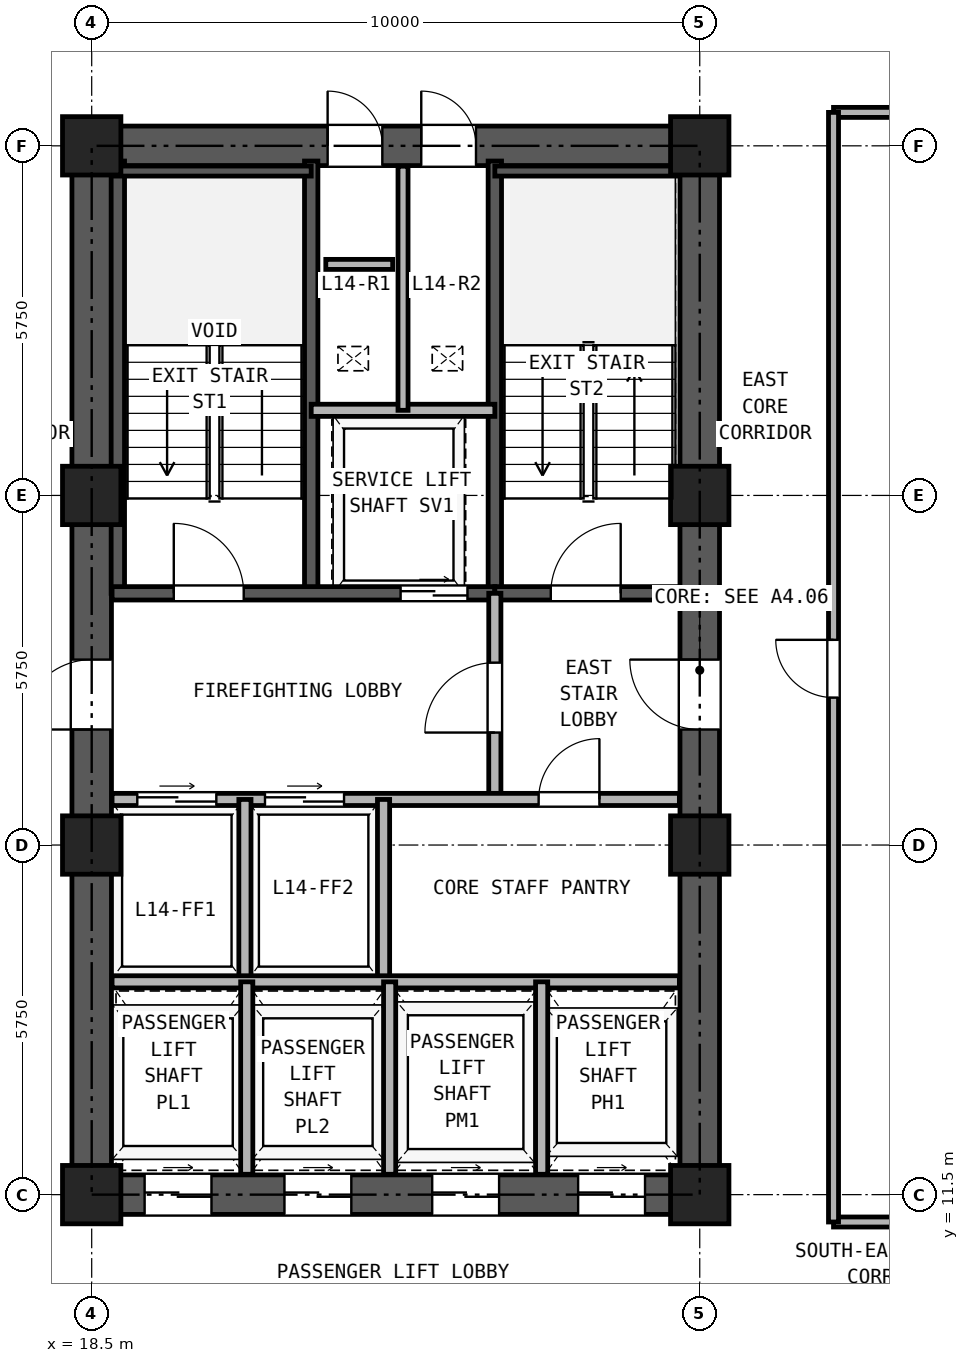
"""IFC4 building model, lengths in metres.
Left out: names, types, materials, properties, quantities, classifications, styles, units other than length and angle.
Written with IfcOpenShell. Run it as: python <this file> out.ifc"""

import sys

from ifc_helpers import new_model, si_unit, direction, frame, frame_2d, origin, origin_2d, place, context, subcontext, project, spatial, rectangle, hollow_rectangle, extrude, source, transform, mapped, element, fill, save


model = new_model("IFC4")
c1 = context("Model", 3, precision=1e-05, world=origin(), true_north=direction((0.0, 1.0)))
c2 = subcontext(c1, "Body", "Model", "MODEL_VIEW")
j1 = project(units=[si_unit("LENGTHUNIT", "METRE"), si_unit("PLANEANGLEUNIT", "RADIAN")], contexts=[c1])
p1 = place(None, origin())
s1 = spatial("IfcSite", under=j1, at=p1, CompositionType="ELEMENT")
p2 = place(p1, origin())
s2 = spatial("IfcBuilding", under=s1, at=p2, CompositionType="ELEMENT")
p3 = place(p2, frame((0.0, 0.0, 54.9)))
s3 = spatial("IfcBuildingStorey", under=s2, at=p3, CompositionType="ELEMENT", Elevation=54.9)
m1 = source(origin(), c2, "Body", "SweptSolid", [
    extrude(hollow_rectangle(XDim=0.96, YDim=0.96, WallThickness=0.06, at=origin_2d()), origin(), (0.0, 0.0, 1.0), 3.32),
])
for number, where, z_axis, x_axis in (
    (1, (18.5, 11.5, 0.0), (0.0, 0.0, 1.0), (1.0, 0.0, 0.0)),
    (2, (18.5, 17.25, 0.0), (0.0, 0.0, 1.0), (1.0, 0.0, 0.0)),
    (3, (18.5, 23.0, 0.0), (0.0, 0.0, 1.0), (1.0, 0.0, 0.0)),
    (4, (18.5, 28.75, 0.0), (0.0, 0.0, 1.0), (1.0, 0.0, 0.0)),
    (5, (28.5, 11.5, 0.0), (0.0, 0.0, 1.0), (1.0, 0.0, 0.0)),
    (6, (28.5, 17.25, 0.0), (0.0, 0.0, 1.0), (1.0, 0.0, 0.0)),
    (7, (28.5, 23.0, 0.0), (0.0, 0.0, 1.0), (1.0, 0.0, 0.0)),
    (8, (28.5, 28.75, 0.0), (0.0, 0.0, 1.0), (1.0, 0.0, 0.0)),
):
    element("IfcColumn", number, at=place(p3, frame(where, z_axis=z_axis, x_axis=x_axis)), inside=s3, PredefinedType="COLUMN", context=c2, shape_type="MappedRepresentation", body=[
        mapped(m1, transform((0.0, 0.0, 0.0), x_axis=(1.0, 0.0, 0.0), y_axis=(0.0, 1.0, 0.0), z_axis=(0.0, 0.0, 1.0), scale=1.0)),
    ])
p4 = place(p3, frame((18.175, 11.5, 0.0), z_axis=(0.0, 0.0, 1.0), x_axis=(1.0, 0.0, 0.0)))
e9 = element("IfcWall", 9, at=p4, inside=s3, PredefinedType="SHEAR", context=c2, shape_type="SweptSolid", body=[
    extrude(rectangle(XDim=10.65, YDim=0.65, at=frame_2d((5.325, 0.0))), origin(), (0.0, 0.0, 1.0), 3.32),
])
p5 = place(p4, frame((1.195, 0.0, 0.0)))
e10 = element("IfcOpeningElement", 10, at=p5, cuts=e9, PredefinedType="OPENING", context=c2, shape_type="SweptSolid", body=[
    extrude(rectangle(XDim=1.1, YDim=2.25, at=frame_2d((0.55, 1.125))), frame((0.0, 0.335, 0.0), z_axis=(0.0, -1.0, 0.0), x_axis=(1.0, 0.0, 0.0)), (0.0, 0.0, 1.0), 0.67),
])
p6 = place(p4, frame((3.495, 0.0, 0.0)))
e11 = element("IfcOpeningElement", 11, at=p6, cuts=e9, PredefinedType="OPENING", context=c2, shape_type="SweptSolid", body=[
    extrude(rectangle(XDim=1.1, YDim=2.25, at=frame_2d((0.55, 1.125))), frame((0.0, 0.335, 0.0), z_axis=(0.0, -1.0, 0.0), x_axis=(1.0, 0.0, 0.0)), (0.0, 0.0, 1.0), 0.67),
])
p7 = place(p4, frame((5.925, 0.0, 0.0)))
e12 = element("IfcOpeningElement", 12, at=p7, cuts=e9, PredefinedType="OPENING", context=c2, shape_type="SweptSolid", body=[
    extrude(rectangle(XDim=1.1, YDim=2.25, at=frame_2d((0.55, 1.125))), frame((0.0, 0.335, 0.0), z_axis=(0.0, -1.0, 0.0), x_axis=(1.0, 0.0, 0.0)), (0.0, 0.0, 1.0), 0.67),
])
p8 = place(p4, frame((8.325, 0.0, 0.0)))
e13 = element("IfcOpeningElement", 13, at=p8, cuts=e9, PredefinedType="OPENING", context=c2, shape_type="SweptSolid", body=[
    extrude(rectangle(XDim=1.1, YDim=2.25, at=frame_2d((0.55, 1.125))), frame((0.0, 0.335, 0.0), z_axis=(0.0, -1.0, 0.0), x_axis=(1.0, 0.0, 0.0)), (0.0, 0.0, 1.0), 0.67),
])
p9 = place(p3, frame((18.175, 28.75, 0.0), z_axis=(0.0, 0.0, 1.0), x_axis=(1.0, 0.0, 0.0)))
e14 = element("IfcWall", 14, at=p9, inside=s3, PredefinedType="SHEAR", context=c2, shape_type="SweptSolid", body=[
    extrude(rectangle(XDim=10.65, YDim=0.65, at=frame_2d((5.325, 0.0))), origin(), (0.0, 0.0, 1.0), 3.32),
])
p10 = place(p9, frame((4.205, 0.0, 0.0)))
e15 = element("IfcOpeningElement", 15, at=p10, cuts=e14, PredefinedType="OPENING", context=c2, shape_type="SweptSolid", body=[
    extrude(rectangle(XDim=0.9, YDim=2.05, at=frame_2d((0.45, 1.025))), frame((0.0, 0.335, 0.0), z_axis=(0.0, -1.0, 0.0), x_axis=(1.0, 0.0, 0.0)), (0.0, 0.0, 1.0), 0.67),
])
p11 = place(p9, frame((5.745, 0.0, 0.0)))
e16 = element("IfcOpeningElement", 16, at=p11, cuts=e14, PredefinedType="OPENING", context=c2, shape_type="SweptSolid", body=[
    extrude(rectangle(XDim=0.9, YDim=2.05, at=frame_2d((0.45, 1.025))), frame((0.0, 0.335, 0.0), z_axis=(0.0, -1.0, 0.0), x_axis=(1.0, 0.0, 0.0)), (0.0, 0.0, 1.0), 0.67),
])
p12 = place(p3, frame((18.5, 11.825, 0.0), z_axis=(0.0, 0.0, 1.0), x_axis=(0.0, 1.0, 0.0)))
e17 = element("IfcWall", 17, at=p12, inside=s3, PredefinedType="SHEAR", context=c2, shape_type="SweptSolid", body=[
    extrude(rectangle(XDim=16.6, YDim=0.65, at=frame_2d((8.3, 0.0))), origin(), (0.0, 0.0, 1.0), 3.32),
])
p13 = place(p12, frame((7.325, 0.0, 0.0)))
e18 = element("IfcOpeningElement", 18, at=p13, cuts=e17, PredefinedType="OPENING", context=c2, shape_type="SweptSolid", body=[
    extrude(rectangle(XDim=1.15, YDim=2.2, at=frame_2d((0.575, 1.1))), frame((0.0, 0.335, 0.0), z_axis=(0.0, -1.0, 0.0), x_axis=(1.0, 0.0, 0.0)), (0.0, 0.0, 1.0), 0.67),
])
p14 = place(p3, frame((28.5, 11.825, 0.0), z_axis=(0.0, 0.0, 1.0), x_axis=(0.0, 1.0, 0.0)))
e19 = element("IfcWall", 19, at=p14, inside=s3, PredefinedType="SHEAR", context=c2, shape_type="SweptSolid", body=[
    extrude(rectangle(XDim=16.6, YDim=0.65, at=frame_2d((8.3, 0.0))), origin(), (0.0, 0.0, 1.0), 3.32),
])
p15 = place(p14, frame((7.325, 0.0, 0.0)))
e20 = element("IfcOpeningElement", 20, at=p15, cuts=e19, PredefinedType="OPENING", context=c2, shape_type="SweptSolid", body=[
    extrude(rectangle(XDim=1.15, YDim=2.2, at=frame_2d((0.575, 1.1))), frame((0.0, 0.335, 0.0), z_axis=(0.0, -1.0, 0.0), x_axis=(1.0, 0.0, 0.0)), (0.0, 0.0, 1.0), 0.67),
])
for number, where, z_axis, x_axis in (
    (21, (18.93, 21.39, 0.0), (0.0, 0.0, 1.0), (0.0, 1.0, 0.0)),
    (22, (22.11, 21.39, 0.0), (0.0, 0.0, 1.0), (0.0, 1.0, 0.0)),
    (23, (25.13, 21.39, 0.0), (0.0, 0.0, 1.0), (0.0, 1.0, 0.0)),
):
    element("IfcWall", number, at=place(p3, frame(where, z_axis=z_axis, x_axis=x_axis)), inside=s3, PredefinedType="SOLIDWALL", context=c2, shape_type="SweptSolid", body=[
        extrude(rectangle(XDim=7.11, YDim=0.22, at=frame_2d((3.555, 0.0))), origin(), (0.0, 0.0, 1.0), 3.32),
    ])
p16 = place(p3, frame((18.835, 28.335, 0.0), z_axis=(0.0, 0.0, 1.0), x_axis=(1.0, 0.0, 0.0)))
e24 = element("IfcWall", 24, at=p16, inside=s3, PredefinedType="PARTITIONING", context=c2, shape_type="SweptSolid", body=[
    extrude(rectangle(XDim=3.275, YDim=0.165, at=frame_2d((1.638, 0.0))), origin(), (0.0, 0.0, 1.0), 3.32),
])
p17 = place(p3, frame((25.13, 28.335, 0.0), z_axis=(0.0, 0.0, 1.0), x_axis=(1.0, 0.0, 0.0)))
e25 = element("IfcWall", 25, at=p17, inside=s3, PredefinedType="PARTITIONING", context=c2, shape_type="SweptSolid", body=[
    extrude(rectangle(XDim=3.035, YDim=0.165, at=frame_2d((1.518, 0.0))), origin(), (0.0, 0.0, 1.0), 3.32),
])
p18 = place(p3, frame((18.835, 21.39, 0.0), z_axis=(0.0, 0.0, 1.0), x_axis=(1.0, 0.0, 0.0)))
e26 = element("IfcWall", 26, at=p18, inside=s3, PredefinedType="SOLIDWALL", context=c2, shape_type="SweptSolid", body=[
    extrude(rectangle(XDim=6.295, YDim=0.22, at=frame_2d((3.147, 0.0))), origin(), (0.0, 0.0, 1.0), 3.32),
])
p19 = place(p18, frame((1.015, 0.0, 0.0)))
e27 = element("IfcOpeningElement", 27, at=p19, cuts=e26, PredefinedType="OPENING", context=c2, shape_type="SweptSolid", body=[
    extrude(rectangle(XDim=1.15, YDim=2.2, at=frame_2d((0.575, 1.1))), frame((0.0, 0.12, 0.0), z_axis=(0.0, -1.0, 0.0), x_axis=(1.0, 0.0, 0.0)), (0.0, 0.0, 1.0), 0.24),
])
p20 = place(p18, frame((4.745, 0.0, 0.0)))
e28 = element("IfcOpeningElement", 28, at=p20, cuts=e26, PredefinedType="OPENING", context=c2, shape_type="SweptSolid", body=[
    extrude(rectangle(XDim=1.1, YDim=2.25, at=frame_2d((0.55, 1.125))), frame((0.0, 0.12, 0.0), z_axis=(0.0, -1.0, 0.0), x_axis=(1.0, 0.0, 0.0)), (0.0, 0.0, 1.0), 0.24),
])
p21 = place(p3, frame((25.13, 21.39, 0.0), z_axis=(0.0, 0.0, 1.0), x_axis=(1.0, 0.0, 0.0)))
e29 = element("IfcWall", 29, at=p21, inside=s3, PredefinedType="SOLIDWALL", context=c2, shape_type="SweptSolid", body=[
    extrude(rectangle(XDim=3.035, YDim=0.22, at=frame_2d((1.518, 0.0))), origin(), (0.0, 0.0, 1.0), 3.32),
])
p22 = place(p21, frame((0.92, 0.0, 0.0)))
e30 = element("IfcOpeningElement", 30, at=p22, cuts=e29, PredefinedType="OPENING", context=c2, shape_type="SweptSolid", body=[
    extrude(rectangle(XDim=1.15, YDim=2.2, at=frame_2d((0.575, 1.1))), frame((0.0, 0.12, 0.0), z_axis=(0.0, -1.0, 0.0), x_axis=(1.0, 0.0, 0.0)), (0.0, 0.0, 1.0), 0.24),
])
p23 = place(p3, frame((22.11, 24.4, 0.0), z_axis=(0.0, 0.0, 1.0), x_axis=(1.0, 0.0, 0.0)))
e31 = element("IfcWall", 31, at=p23, inside=s3, PredefinedType="PARTITIONING", context=c2, shape_type="SweptSolid", body=[
    extrude(rectangle(XDim=3.02, YDim=0.2, at=frame_2d((1.51, 0.0))), origin(), (0.0, 0.0, 1.0), 3.32),
])
p24 = place(p3, frame((23.62, 24.4, 0.0), z_axis=(0.0, 0.0, 1.0), x_axis=(0.0, 1.0, 0.0)))
e32 = element("IfcWall", 32, at=p24, inside=s3, PredefinedType="PARTITIONING", context=c2, shape_type="SweptSolid", body=[
    extrude(rectangle(XDim=4.015, YDim=0.165, at=frame_2d((2.008, 0.0))), origin(), (0.0, 0.0, 1.0), 3.32),
])
p25 = place(p3, frame((25.13, 18.0, 0.0), z_axis=(0.0, 0.0, 1.0), x_axis=(0.0, 1.0, 0.0)))
e33 = element("IfcWall", 33, at=p25, inside=s3, PredefinedType="PARTITIONING", context=c2, shape_type="SweptSolid", body=[
    extrude(rectangle(XDim=3.39, YDim=0.2, at=frame_2d((1.695, 0.0))), origin(), (0.0, 0.0, 1.0), 3.32),
])
p26 = place(p25, frame((1.1, 0.0, 0.0)))
e34 = element("IfcOpeningElement", 34, at=p26, cuts=e33, PredefinedType="OPENING", context=c2, shape_type="SweptSolid", body=[
    extrude(rectangle(XDim=1.15, YDim=2.2, at=frame_2d((0.575, 1.1))), frame((0.0, 0.11, 0.0), z_axis=(0.0, -1.0, 0.0), x_axis=(1.0, 0.0, 0.0)), (0.0, 0.0, 1.0), 0.22),
])
p27 = place(p3, frame((18.835, 18.0, 0.0), z_axis=(0.0, 0.0, 1.0), x_axis=(1.0, 0.0, 0.0)))
e35 = element("IfcWall", 35, at=p27, inside=s3, PredefinedType="PARTITIONING", context=c2, shape_type="SweptSolid", body=[
    extrude(rectangle(XDim=9.33, YDim=0.2, at=frame_2d((4.665, 0.0))), origin(), (0.0, 0.0, 1.0), 3.32),
])
p28 = place(p27, frame((0.415, 0.0, 0.0)))
e36 = element("IfcOpeningElement", 36, at=p28, cuts=e35, PredefinedType="OPENING", context=c2, shape_type="SweptSolid", body=[
    extrude(rectangle(XDim=1.3, YDim=2.3, at=frame_2d((0.65, 1.15))), frame((0.0, 0.11, 0.0), z_axis=(0.0, -1.0, 0.0), x_axis=(1.0, 0.0, 0.0)), (0.0, 0.0, 1.0), 0.22),
])
p29 = place(p27, frame((2.515, 0.0, 0.0)))
e37 = element("IfcOpeningElement", 37, at=p29, cuts=e35, PredefinedType="OPENING", context=c2, shape_type="SweptSolid", body=[
    extrude(rectangle(XDim=1.3, YDim=2.3, at=frame_2d((0.65, 1.15))), frame((0.0, 0.11, 0.0), z_axis=(0.0, -1.0, 0.0), x_axis=(1.0, 0.0, 0.0)), (0.0, 0.0, 1.0), 0.22),
])
p30 = place(p27, frame((7.015, 0.0, 0.0)))
e38 = element("IfcOpeningElement", 38, at=p30, cuts=e35, PredefinedType="OPENING", context=c2, shape_type="SweptSolid", body=[
    extrude(rectangle(XDim=1.0, YDim=2.15, at=frame_2d((0.5, 1.075))), frame((0.0, 0.11, 0.0), z_axis=(0.0, -1.0, 0.0), x_axis=(1.0, 0.0, 0.0)), (0.0, 0.0, 1.0), 0.22),
])
for number, where, z_axis, x_axis in (
    (39, (21.02, 15.0, 0.0), (0.0, 0.0, 1.0), (0.0, 1.0, 0.0)),
    (40, (23.3, 15.0, 0.0), (0.0, 0.0, 1.0), (0.0, 1.0, 0.0)),
):
    element("IfcWall", number, at=place(p3, frame(where, z_axis=z_axis, x_axis=x_axis)), inside=s3, PredefinedType="PARTITIONING", context=c2, shape_type="SweptSolid", body=[
        extrude(rectangle(XDim=3.0, YDim=0.2, at=frame_2d((1.5, 0.0))), origin(), (0.0, 0.0, 1.0), 3.32),
    ])
p31 = place(p3, frame((18.835, 15.0, 0.0), z_axis=(0.0, 0.0, 1.0), x_axis=(1.0, 0.0, 0.0)))
e41 = element("IfcWall", 41, at=p31, inside=s3, PredefinedType="PARTITIONING", context=c2, shape_type="SweptSolid", body=[
    extrude(rectangle(XDim=9.33, YDim=0.2, at=frame_2d((4.665, 0.0))), origin(), (0.0, 0.0, 1.0), 3.32),
])
for number, where, z_axis, x_axis in (
    (42, (21.05, 11.835, 0.0), (0.0, 0.0, 1.0), (0.0, 1.0, 0.0)),
    (43, (23.4, 11.835, 0.0), (0.0, 0.0, 1.0), (0.0, 1.0, 0.0)),
    (44, (25.9, 11.835, 0.0), (0.0, 0.0, 1.0), (0.0, 1.0, 0.0)),
):
    element("IfcWall", number, at=place(p3, frame(where, z_axis=z_axis, x_axis=x_axis)), inside=s3, PredefinedType="PARTITIONING", context=c2, shape_type="SweptSolid", body=[
        extrude(rectangle(XDim=3.165, YDim=0.2, at=frame_2d((1.583, 0.0))), origin(), (0.0, 0.0, 1.0), 3.32),
    ])
for number, where, z_axis, x_axis in (
    (45, (30.7, 11.05, 0.0), (0.0, 0.0, 1.0), (1.0, 0.0, 0.0)),
    (46, (30.7, 29.3, 0.0), (0.0, 0.0, 1.0), (1.0, 0.0, 0.0)),
):
    element("IfcWall", number, at=place(p3, frame(where, z_axis=z_axis, x_axis=x_axis)), inside=s3, PredefinedType="PARTITIONING", context=c2, shape_type="SweptSolid", body=[
        extrude(rectangle(XDim=7.3, YDim=0.165, at=frame_2d((3.65, 0.0))), origin(), (0.0, 0.0, 1.0), 3.32),
    ])
p32 = place(p3, frame((30.7, 11.05, 0.0), z_axis=(0.0, 0.0, 1.0), x_axis=(0.0, 1.0, 0.0)))
e47 = element("IfcWall", 47, at=p32, inside=s3, PredefinedType="PARTITIONING", context=c2, shape_type="SweptSolid", body=[
    extrude(rectangle(XDim=18.25, YDim=0.165, at=frame_2d((9.125, 0.0))), origin(), (0.0, 0.0, 1.0), 3.32),
])
p33 = place(p32, frame((8.625, 0.0, 0.0)))
e48 = element("IfcOpeningElement", 48, at=p33, cuts=e47, PredefinedType="OPENING", context=c2, shape_type="SweptSolid", body=[
    extrude(rectangle(XDim=0.95, YDim=2.15, at=frame_2d((0.475, 1.075))), frame((0.0, 0.093, 0.0), z_axis=(0.0, -1.0, 0.0), x_axis=(1.0, 0.0, 0.0)), (0.0, 0.0, 1.0), 0.185),
])
p34 = place(p3, frame((22.35, 26.8, 0.0), z_axis=(0.0, 0.0, 1.0), x_axis=(1.0, 0.0, 0.0)))
e49 = element("IfcWall", 49, at=p34, inside=s3, PredefinedType="PARTITIONING", context=c2, shape_type="SweptSolid", body=[
    extrude(rectangle(XDim=1.1, YDim=0.165, at=frame_2d((0.55, 0.0))), origin(), (0.0, 0.0, 1.0), 3.32),
])
p35 = place(p19, frame((1.15, 0.0, 0.0), z_axis=(0.0, 0.0, 1.0), x_axis=(-1.0, 0.0, 0.0)))
e50 = element("IfcDoor", 50, at=p35, inside=s3, OperationType="SINGLE_SWING_LEFT", PredefinedType="DOOR", context=c2, shape_type="SweptSolid", body=[
    extrude(rectangle(XDim=1.15, YDim=2.2, at=frame_2d((0.575, 1.1))), frame((0.0, 0.025, 0.0), z_axis=(0.0, -1.0, 0.0), x_axis=(1.0, 0.0, 0.0)), (0.0, 0.0, 1.0), 0.05),
])
fill(e27, e50)
p36 = place(p22, frame((1.15, 0.0, 0.0), z_axis=(0.0, 0.0, 1.0), x_axis=(-1.0, 0.0, 0.0)))
e51 = element("IfcDoor", 51, at=p36, inside=s3, OperationType="SINGLE_SWING_RIGHT", PredefinedType="DOOR", context=c2, shape_type="SweptSolid", body=[
    extrude(rectangle(XDim=1.15, YDim=2.2, at=frame_2d((0.575, 1.1))), frame((0.0, 0.025, 0.0), z_axis=(0.0, -1.0, 0.0), x_axis=(1.0, 0.0, 0.0)), (0.0, 0.0, 1.0), 0.05),
])
fill(e30, e51)
p37 = place(p20, frame((1.1, 0.0, 0.0), z_axis=(0.0, 0.0, 1.0), x_axis=(-1.0, 0.0, 0.0)))
e52 = element("IfcDoor", 52, at=p37, inside=s3, OperationType="DOUBLE_DOOR_SLIDING", PredefinedType="DOOR", context=c2, shape_type="SweptSolid", body=[
    extrude(rectangle(XDim=1.1, YDim=2.25, at=frame_2d((0.55, 1.125))), frame((0.0, 0.025, 0.0), z_axis=(0.0, -1.0, 0.0), x_axis=(1.0, 0.0, 0.0)), (0.0, 0.0, 1.0), 0.05),
])
fill(e28, e52)
p38 = place(p26, origin())
e53 = element("IfcDoor", 53, at=p38, inside=s3, OperationType="SINGLE_SWING_LEFT", PredefinedType="DOOR", context=c2, shape_type="SweptSolid", body=[
    extrude(rectangle(XDim=1.15, YDim=2.2, at=frame_2d((0.575, 1.1))), frame((0.0, 0.025, 0.0), z_axis=(0.0, -1.0, 0.0), x_axis=(1.0, 0.0, 0.0)), (0.0, 0.0, 1.0), 0.05),
])
fill(e34, e53)
p39 = place(p28, origin())
e54 = element("IfcDoor", 54, at=p39, inside=s3, OperationType="DOUBLE_DOOR_SLIDING", PredefinedType="DOOR", context=c2, shape_type="SweptSolid", body=[
    extrude(rectangle(XDim=1.3, YDim=2.3, at=frame_2d((0.65, 1.15))), frame((0.0, 0.025, 0.0), z_axis=(0.0, -1.0, 0.0), x_axis=(1.0, 0.0, 0.0)), (0.0, 0.0, 1.0), 0.05),
])
fill(e36, e54)
p40 = place(p29, origin())
e55 = element("IfcDoor", 55, at=p40, inside=s3, OperationType="DOUBLE_DOOR_SLIDING", PredefinedType="DOOR", context=c2, shape_type="SweptSolid", body=[
    extrude(rectangle(XDim=1.3, YDim=2.3, at=frame_2d((0.65, 1.15))), frame((0.0, 0.025, 0.0), z_axis=(0.0, -1.0, 0.0), x_axis=(1.0, 0.0, 0.0)), (0.0, 0.0, 1.0), 0.05),
])
fill(e37, e55)
p41 = place(p30, frame((1.0, 0.0, 0.0), z_axis=(0.0, 0.0, 1.0), x_axis=(-1.0, 0.0, 0.0)))
e56 = element("IfcDoor", 56, at=p41, inside=s3, OperationType="SINGLE_SWING_RIGHT", PredefinedType="DOOR", context=c2, shape_type="SweptSolid", body=[
    extrude(rectangle(XDim=1.0, YDim=2.15, at=frame_2d((0.5, 1.075))), frame((0.0, 0.025, 0.0), z_axis=(0.0, -1.0, 0.0), x_axis=(1.0, 0.0, 0.0)), (0.0, 0.0, 1.0), 0.05),
])
fill(e38, e56)
p42 = place(p13, frame((1.15, 0.0, 0.0), z_axis=(0.0, 0.0, 1.0), x_axis=(-1.0, 0.0, 0.0)))
e57 = element("IfcDoor", 57, at=p42, inside=s3, OperationType="SINGLE_SWING_LEFT", PredefinedType="DOOR", context=c2, shape_type="SweptSolid", body=[
    extrude(rectangle(XDim=1.15, YDim=2.2, at=frame_2d((0.575, 1.1))), frame((0.0, 0.025, 0.0), z_axis=(0.0, -1.0, 0.0), x_axis=(1.0, 0.0, 0.0)), (0.0, 0.0, 1.0), 0.05),
])
fill(e18, e57)
p43 = place(p15, origin())
e58 = element("IfcDoor", 58, at=p43, inside=s3, OperationType="SINGLE_SWING_RIGHT", PredefinedType="DOOR", context=c2, shape_type="SweptSolid", body=[
    extrude(rectangle(XDim=1.15, YDim=2.2, at=frame_2d((0.575, 1.1))), frame((0.0, 0.025, 0.0), z_axis=(0.0, -1.0, 0.0), x_axis=(1.0, 0.0, 0.0)), (0.0, 0.0, 1.0), 0.05),
])
fill(e20, e58)
p44 = place(p10, origin())
e59 = element("IfcDoor", 59, at=p44, inside=s3, OperationType="SINGLE_SWING_LEFT", PredefinedType="DOOR", context=c2, shape_type="SweptSolid", body=[
    extrude(rectangle(XDim=0.9, YDim=2.05, at=frame_2d((0.45, 1.025))), frame((0.0, 0.025, 0.0), z_axis=(0.0, -1.0, 0.0), x_axis=(1.0, 0.0, 0.0)), (0.0, 0.0, 1.0), 0.05),
])
fill(e15, e59)
p45 = place(p11, origin())
e60 = element("IfcDoor", 60, at=p45, inside=s3, OperationType="SINGLE_SWING_LEFT", PredefinedType="DOOR", context=c2, shape_type="SweptSolid", body=[
    extrude(rectangle(XDim=0.9, YDim=2.05, at=frame_2d((0.45, 1.025))), frame((0.0, 0.025, 0.0), z_axis=(0.0, -1.0, 0.0), x_axis=(1.0, 0.0, 0.0)), (0.0, 0.0, 1.0), 0.05),
])
fill(e16, e60)
p46 = place(p5, frame((1.1, 0.0, 0.0), z_axis=(0.0, 0.0, 1.0), x_axis=(-1.0, 0.0, 0.0)))
e61 = element("IfcDoor", 61, at=p46, inside=s3, OperationType="DOUBLE_DOOR_SLIDING", PredefinedType="DOOR", context=c2, shape_type="SweptSolid", body=[
    extrude(rectangle(XDim=1.1, YDim=2.25, at=frame_2d((0.55, 1.125))), frame((0.0, 0.025, 0.0), z_axis=(0.0, -1.0, 0.0), x_axis=(1.0, 0.0, 0.0)), (0.0, 0.0, 1.0), 0.05),
])
fill(e10, e61)
p47 = place(p6, frame((1.1, 0.0, 0.0), z_axis=(0.0, 0.0, 1.0), x_axis=(-1.0, 0.0, 0.0)))
e62 = element("IfcDoor", 62, at=p47, inside=s3, OperationType="DOUBLE_DOOR_SLIDING", PredefinedType="DOOR", context=c2, shape_type="SweptSolid", body=[
    extrude(rectangle(XDim=1.1, YDim=2.25, at=frame_2d((0.55, 1.125))), frame((0.0, 0.025, 0.0), z_axis=(0.0, -1.0, 0.0), x_axis=(1.0, 0.0, 0.0)), (0.0, 0.0, 1.0), 0.05),
])
fill(e11, e62)
p48 = place(p7, frame((1.1, 0.0, 0.0), z_axis=(0.0, 0.0, 1.0), x_axis=(-1.0, 0.0, 0.0)))
e63 = element("IfcDoor", 63, at=p48, inside=s3, OperationType="DOUBLE_DOOR_SLIDING", PredefinedType="DOOR", context=c2, shape_type="SweptSolid", body=[
    extrude(rectangle(XDim=1.1, YDim=2.25, at=frame_2d((0.55, 1.125))), frame((0.0, 0.025, 0.0), z_axis=(0.0, -1.0, 0.0), x_axis=(1.0, 0.0, 0.0)), (0.0, 0.0, 1.0), 0.05),
])
fill(e12, e63)
p49 = place(p8, frame((1.1, 0.0, 0.0), z_axis=(0.0, 0.0, 1.0), x_axis=(-1.0, 0.0, 0.0)))
e64 = element("IfcDoor", 64, at=p49, inside=s3, OperationType="DOUBLE_DOOR_SLIDING", PredefinedType="DOOR", context=c2, shape_type="SweptSolid", body=[
    extrude(rectangle(XDim=1.1, YDim=2.25, at=frame_2d((0.55, 1.125))), frame((0.0, 0.025, 0.0), z_axis=(0.0, -1.0, 0.0), x_axis=(1.0, 0.0, 0.0)), (0.0, 0.0, 1.0), 0.05),
])
fill(e13, e64)
p50 = place(p33, origin())
e65 = element("IfcDoor", 65, at=p50, inside=s3, OperationType="SINGLE_SWING_RIGHT", PredefinedType="DOOR", context=c2, shape_type="SweptSolid", body=[
    extrude(rectangle(XDim=0.95, YDim=2.15, at=frame_2d((0.475, 1.075))), frame((0.0, 0.025, 0.0), z_axis=(0.0, -1.0, 0.0), x_axis=(1.0, 0.0, 0.0)), (0.0, 0.0, 1.0), 0.05),
])
fill(e48, e65)
save(model, sys.argv[1])
